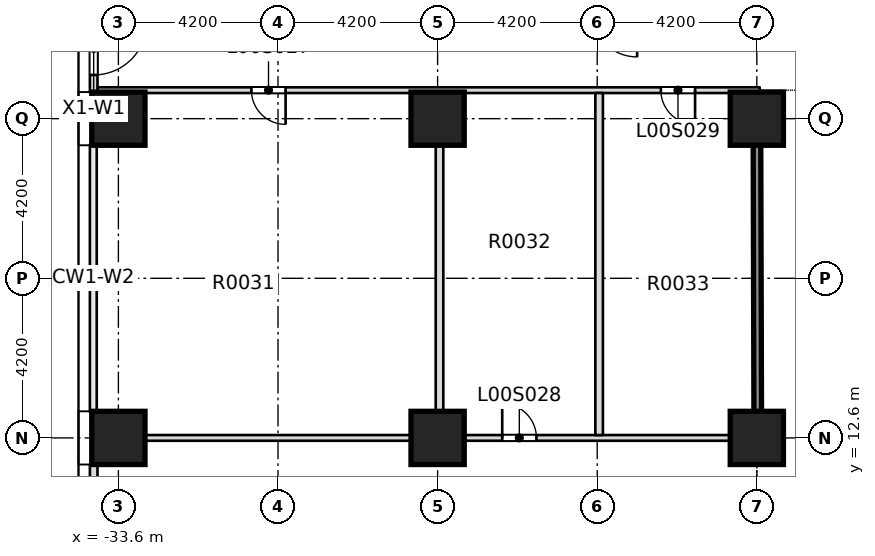
"""IFC4 building model, lengths in metres.
Left out: names, types, materials, properties, quantities, classifications, styles, units other than length and angle.
Written with IfcOpenShell. Run it as: python <this file> out.ifc"""

import sys

from ifc_helpers import new_model, si_unit, direction, frame, frame_2d, origin, origin_2d, place, context, subcontext, project, spatial, rectangle, extrude, element, fill, save


model = new_model("IFC4")
c1 = context("Model", 3, precision=1e-05, world=origin(), true_north=direction((0.0, 1.0)))
c2 = subcontext(c1, "Body", "Model", "MODEL_VIEW")
j1 = project(units=[si_unit("LENGTHUNIT", "METRE"), si_unit("PLANEANGLEUNIT", "RADIAN")], contexts=[c1])
p1 = place(None, origin())
s1 = spatial("IfcSite", under=j1, at=p1, CompositionType="ELEMENT")
p2 = place(p1, origin())
s2 = spatial("IfcBuilding", under=s1, at=p2, CompositionType="ELEMENT")
p3 = place(p2, origin())
s3 = spatial("IfcBuildingStorey", under=s2, at=p3, CompositionType="ELEMENT", Elevation=0.0)
for number, where, z_axis, x_axis in (
    (1, (-25.2, 12.6, -0.45), (0.0, 0.0, 1.0), (1.0, 0.0, 0.0)),
    (2, (-16.8, 12.6, -0.45), (0.0, 0.0, 1.0), (1.0, 0.0, 0.0)),
    (3, (-16.8, 21.0, -0.45), (0.0, 0.0, 1.0), (1.0, 0.0, 0.0)),
):
    element("IfcColumn", number, at=place(p3, frame(where, z_axis=z_axis, x_axis=x_axis)), inside=s3, PredefinedType="COLUMN", context=c2, shape_type="SweptSolid", body=[
        extrude(rectangle(XDim=1.4, YDim=1.4, at=origin_2d()), origin(), (0.0, 0.0, 1.0), 7.55),
    ])
for number, where, z_axis, x_axis in (
    (4, (-33.6, 12.6, 0.0), (0.0, 0.0, 1.0), (1.0, 0.0, 0.0)),
    (5, (-33.6, 21.0, 0.0), (0.0, 0.0, 1.0), (1.0, 0.0, 0.0)),
    (6, (-25.2, 21.0, 0.0), (0.0, 0.0, 1.0), (1.0, 0.0, 0.0)),
):
    element("IfcColumn", number, at=place(p3, frame(where, z_axis=z_axis, x_axis=x_axis)), inside=s3, PredefinedType="COLUMN", context=c2, shape_type="SweptSolid", body=[
        extrude(rectangle(XDim=1.4, YDim=1.4, at=origin_2d()), origin(), (0.0, 0.0, 1.0), 7.5),
    ])
p4 = place(p3, frame((-34.15, 12.6, 0.0), z_axis=(0.0, 0.0, 1.0), x_axis=(1.0, 0.0, 0.0)))
e7 = element("IfcWall", 7, at=p4, inside=s3, PredefinedType="PARTITIONING", context=c2, shape_type="SweptSolid", body=[
    extrude(rectangle(XDim=17.425, YDim=0.15, at=frame_2d((8.712, 0.0))), origin(), (0.0, 0.0, 1.0), 7.1),
])
p5 = place(p4, frame((10.65, 0.0, 0.0)))
e8 = element("IfcOpeningElement", 8, at=p5, cuts=e7, PredefinedType="OPENING", context=c2, shape_type="SweptSolid", body=[
    extrude(rectangle(XDim=0.9, YDim=2.1, at=frame_2d((0.45, 1.05))), frame((0.0, 0.085, 0.0), z_axis=(0.0, -1.0, 0.0), x_axis=(1.0, 0.0, 0.0)), (0.0, 0.0, 1.0), 0.17),
])
p6 = place(p3, frame((-34.15, 21.75, 0.0), z_axis=(0.0, 0.0, 1.0), x_axis=(1.0, 0.0, 0.0)))
e9 = element("IfcWall", 9, at=p6, inside=s3, PredefinedType="PARTITIONING", context=c2, shape_type="SweptSolid", body=[
    extrude(rectangle(XDim=17.425, YDim=0.15, at=frame_2d((8.712, 0.0))), origin(), (0.0, 0.0, 1.0), 7.1),
])
p7 = place(p6, frame((4.05, 0.0, 0.0)))
e10 = element("IfcOpeningElement", 10, at=p7, cuts=e9, PredefinedType="OPENING", context=c2, shape_type="SweptSolid", body=[
    extrude(rectangle(XDim=0.9, YDim=2.1, at=frame_2d((0.45, 1.05))), frame((0.0, 0.085, 0.0), z_axis=(0.0, -1.0, 0.0), x_axis=(1.0, 0.0, 0.0)), (0.0, 0.0, 1.0), 0.17),
])
p8 = place(p6, frame((14.825, 0.0, 0.0)))
e11 = element("IfcOpeningElement", 11, at=p8, cuts=e9, PredefinedType="OPENING", context=c2, shape_type="SweptSolid", body=[
    extrude(rectangle(XDim=0.9, YDim=2.1, at=frame_2d((0.45, 1.05))), frame((0.0, 0.085, 0.0), z_axis=(0.0, -1.0, 0.0), x_axis=(1.0, 0.0, 0.0)), (0.0, 0.0, 1.0), 0.17),
])
for number, where, z_axis, x_axis in (
    (12, (-25.15, 12.675, 0.0), (0.0, 0.0, 1.0), (0.0, 1.0, 0.0)),
    (13, (-20.95, 12.675, 0.0), (0.0, 0.0, 1.0), (0.0, 1.0, 0.0)),
):
    element("IfcWall", number, at=place(p3, frame(where, z_axis=z_axis, x_axis=x_axis)), inside=s3, PredefinedType="PARTITIONING", context=c2, shape_type="SweptSolid", body=[
        extrude(rectangle(XDim=9.0, YDim=0.2, at=frame_2d((4.5, 0.0))), origin(), (0.0, 0.0, 1.0), 7.1),
    ])
p9 = place(p3, frame((-16.775, 12.675, 0.0), z_axis=(0.0, 0.0, 1.0), x_axis=(-0.002759281819, 0.999996193175, 0.0)))
e14 = element("IfcWall", 14, at=p9, inside=s3, PredefinedType="SOLIDWALL", context=c2, shape_type="SweptSolid", body=[
    extrude(rectangle(XDim=9.025, YDim=0.2, at=frame_2d((4.512, 0.0))), origin(), (0.0, 0.0, 1.0), 7.1),
])
p10 = place(p3, frame((-34.25, 21.7, 0.0), z_axis=(0.0, 0.0, 1.0), x_axis=(0.0, 1.0, 0.0)))
e15 = element("IfcWall", 15, at=p10, inside=s3, PredefinedType="STANDARD", context=c2, shape_type="SweptSolid", body=[
    extrude(rectangle(XDim=7.0, YDim=0.2, at=frame_2d((3.5, 0.0))), origin(), (0.0, 0.0, 1.0), 7.1),
])
p11 = place(p10, frame((4.5, 0.0, 0.3)))
e16 = element("IfcOpeningElement", 16, at=p11, cuts=e15, PredefinedType="OPENING", context=c2, shape_type="SweptSolid", body=[
    extrude(rectangle(XDim=1.8, YDim=4.2, at=frame_2d((0.9, 2.1))), frame((0.0, 0.11, 0.0), z_axis=(0.0, -1.0, 0.0), x_axis=(1.0, 0.0, 0.0)), (0.0, 0.0, 1.0), 0.22),
])
p12 = place(p10, frame((2.6, 0.0, 0.0)))
e17 = element("IfcOpeningElement", 17, at=p12, cuts=e15, PredefinedType="OPENING", context=c2, shape_type="SweptSolid", body=[
    extrude(rectangle(XDim=1.8, YDim=2.4, at=frame_2d((0.9, 1.2))), frame((0.0, 0.11, 0.0), z_axis=(0.0, -1.0, 0.0), x_axis=(1.0, 0.0, 0.0)), (0.0, 0.0, 1.0), 0.22),
])
p13 = place(p10, frame((0.45, 0.0, 0.0)))
e18 = element("IfcOpeningElement", 18, at=p13, cuts=e15, PredefinedType="OPENING", context=c2, shape_type="SweptSolid", body=[
    extrude(rectangle(XDim=1.4, YDim=2.1, at=frame_2d((0.7, 1.05))), frame((0.0, 0.11, 0.0), z_axis=(0.0, -1.0, 0.0), x_axis=(1.0, 0.0, 0.0)), (0.0, 0.0, 1.0), 0.22),
])
p14 = place(p3, frame((-34.25, 4.9, 0.0), z_axis=(0.0, 0.0, 1.0), x_axis=(0.0, 1.0, 0.0)))
e19 = element("IfcWall", 19, at=p14, inside=s3, PredefinedType="STANDARD", context=c2, shape_type="SweptSolid", body=[
    extrude(rectangle(XDim=7.0, YDim=0.2, at=frame_2d((3.5, 0.0))), origin(), (0.0, 0.0, 1.0), 7.1),
])
p15 = place(p14, frame((4.5, 0.0, 0.3)))
e20 = element("IfcOpeningElement", 20, at=p15, cuts=e19, PredefinedType="OPENING", context=c2, shape_type="SweptSolid", body=[
    extrude(rectangle(XDim=1.8, YDim=4.2, at=frame_2d((0.9, 2.1))), frame((0.0, 0.11, 0.0), z_axis=(0.0, -1.0, 0.0), x_axis=(1.0, 0.0, 0.0)), (0.0, 0.0, 1.0), 0.22),
])
p16 = place(p14, frame((2.6, 0.0, 0.0)))
e21 = element("IfcOpeningElement", 21, at=p16, cuts=e19, PredefinedType="OPENING", context=c2, shape_type="SweptSolid", body=[
    extrude(rectangle(XDim=1.8, YDim=2.4, at=frame_2d((0.9, 1.2))), frame((0.0, 0.11, 0.0), z_axis=(0.0, -1.0, 0.0), x_axis=(1.0, 0.0, 0.0)), (0.0, 0.0, 1.0), 0.22),
])
p17 = place(p14, frame((0.7, 0.0, 0.3)))
e22 = element("IfcOpeningElement", 22, at=p17, cuts=e19, PredefinedType="OPENING", context=c2, shape_type="SweptSolid", body=[
    extrude(rectangle(XDim=1.8, YDim=4.2, at=frame_2d((0.9, 2.1))), frame((0.0, 0.11, 0.0), z_axis=(0.0, -1.0, 0.0), x_axis=(1.0, 0.0, 0.0)), (0.0, 0.0, 1.0), 0.22),
])
p18 = place(p7, origin())
e23 = element("IfcDoor", 23, at=p18, inside=s3, OperationType="SINGLE_SWING_RIGHT", PredefinedType="DOOR", context=c2, shape_type="SweptSolid", body=[
    extrude(rectangle(XDim=0.9, YDim=2.1, at=frame_2d((0.45, 1.05))), frame((0.0, 0.025, 0.0), z_axis=(0.0, -1.0, 0.0), x_axis=(1.0, 0.0, 0.0)), (0.0, 0.0, 1.0), 0.05),
])
fill(e10, e23)
p19 = place(p5, origin())
e24 = element("IfcDoor", 24, at=p19, inside=s3, OperationType="SINGLE_SWING_RIGHT", PredefinedType="DOOR", context=c2, shape_type="SweptSolid", body=[
    extrude(rectangle(XDim=0.9, YDim=2.1, at=frame_2d((0.45, 1.05))), frame((0.0, 0.025, 0.0), z_axis=(0.0, -1.0, 0.0), x_axis=(1.0, 0.0, 0.0)), (0.0, 0.0, 1.0), 0.05),
])
fill(e8, e24)
p20 = place(p8, origin())
e25 = element("IfcDoor", 25, at=p20, inside=s3, OperationType="SINGLE_SWING_LEFT", PredefinedType="DOOR", context=c2, shape_type="SweptSolid", body=[
    extrude(rectangle(XDim=0.9, YDim=2.1, at=frame_2d((0.45, 1.05))), frame((0.0, 0.025, 0.0), z_axis=(0.0, -1.0, 0.0), x_axis=(1.0, 0.0, 0.0)), (0.0, 0.0, 1.0), 0.05),
])
fill(e11, e25)
p21 = place(p13, origin())
e26 = element("IfcDoor", 26, at=p21, inside=s3, OperationType="SINGLE_SWING_LEFT", PredefinedType="DOOR", context=c2, shape_type="SweptSolid", body=[
    extrude(rectangle(XDim=1.4, YDim=2.1, at=frame_2d((0.7, 1.05))), frame((0.0, 0.025, 0.0), z_axis=(0.0, -1.0, 0.0), x_axis=(1.0, 0.0, 0.0)), (0.0, 0.0, 1.0), 0.05),
])
fill(e18, e26)
save(model, sys.argv[1])
